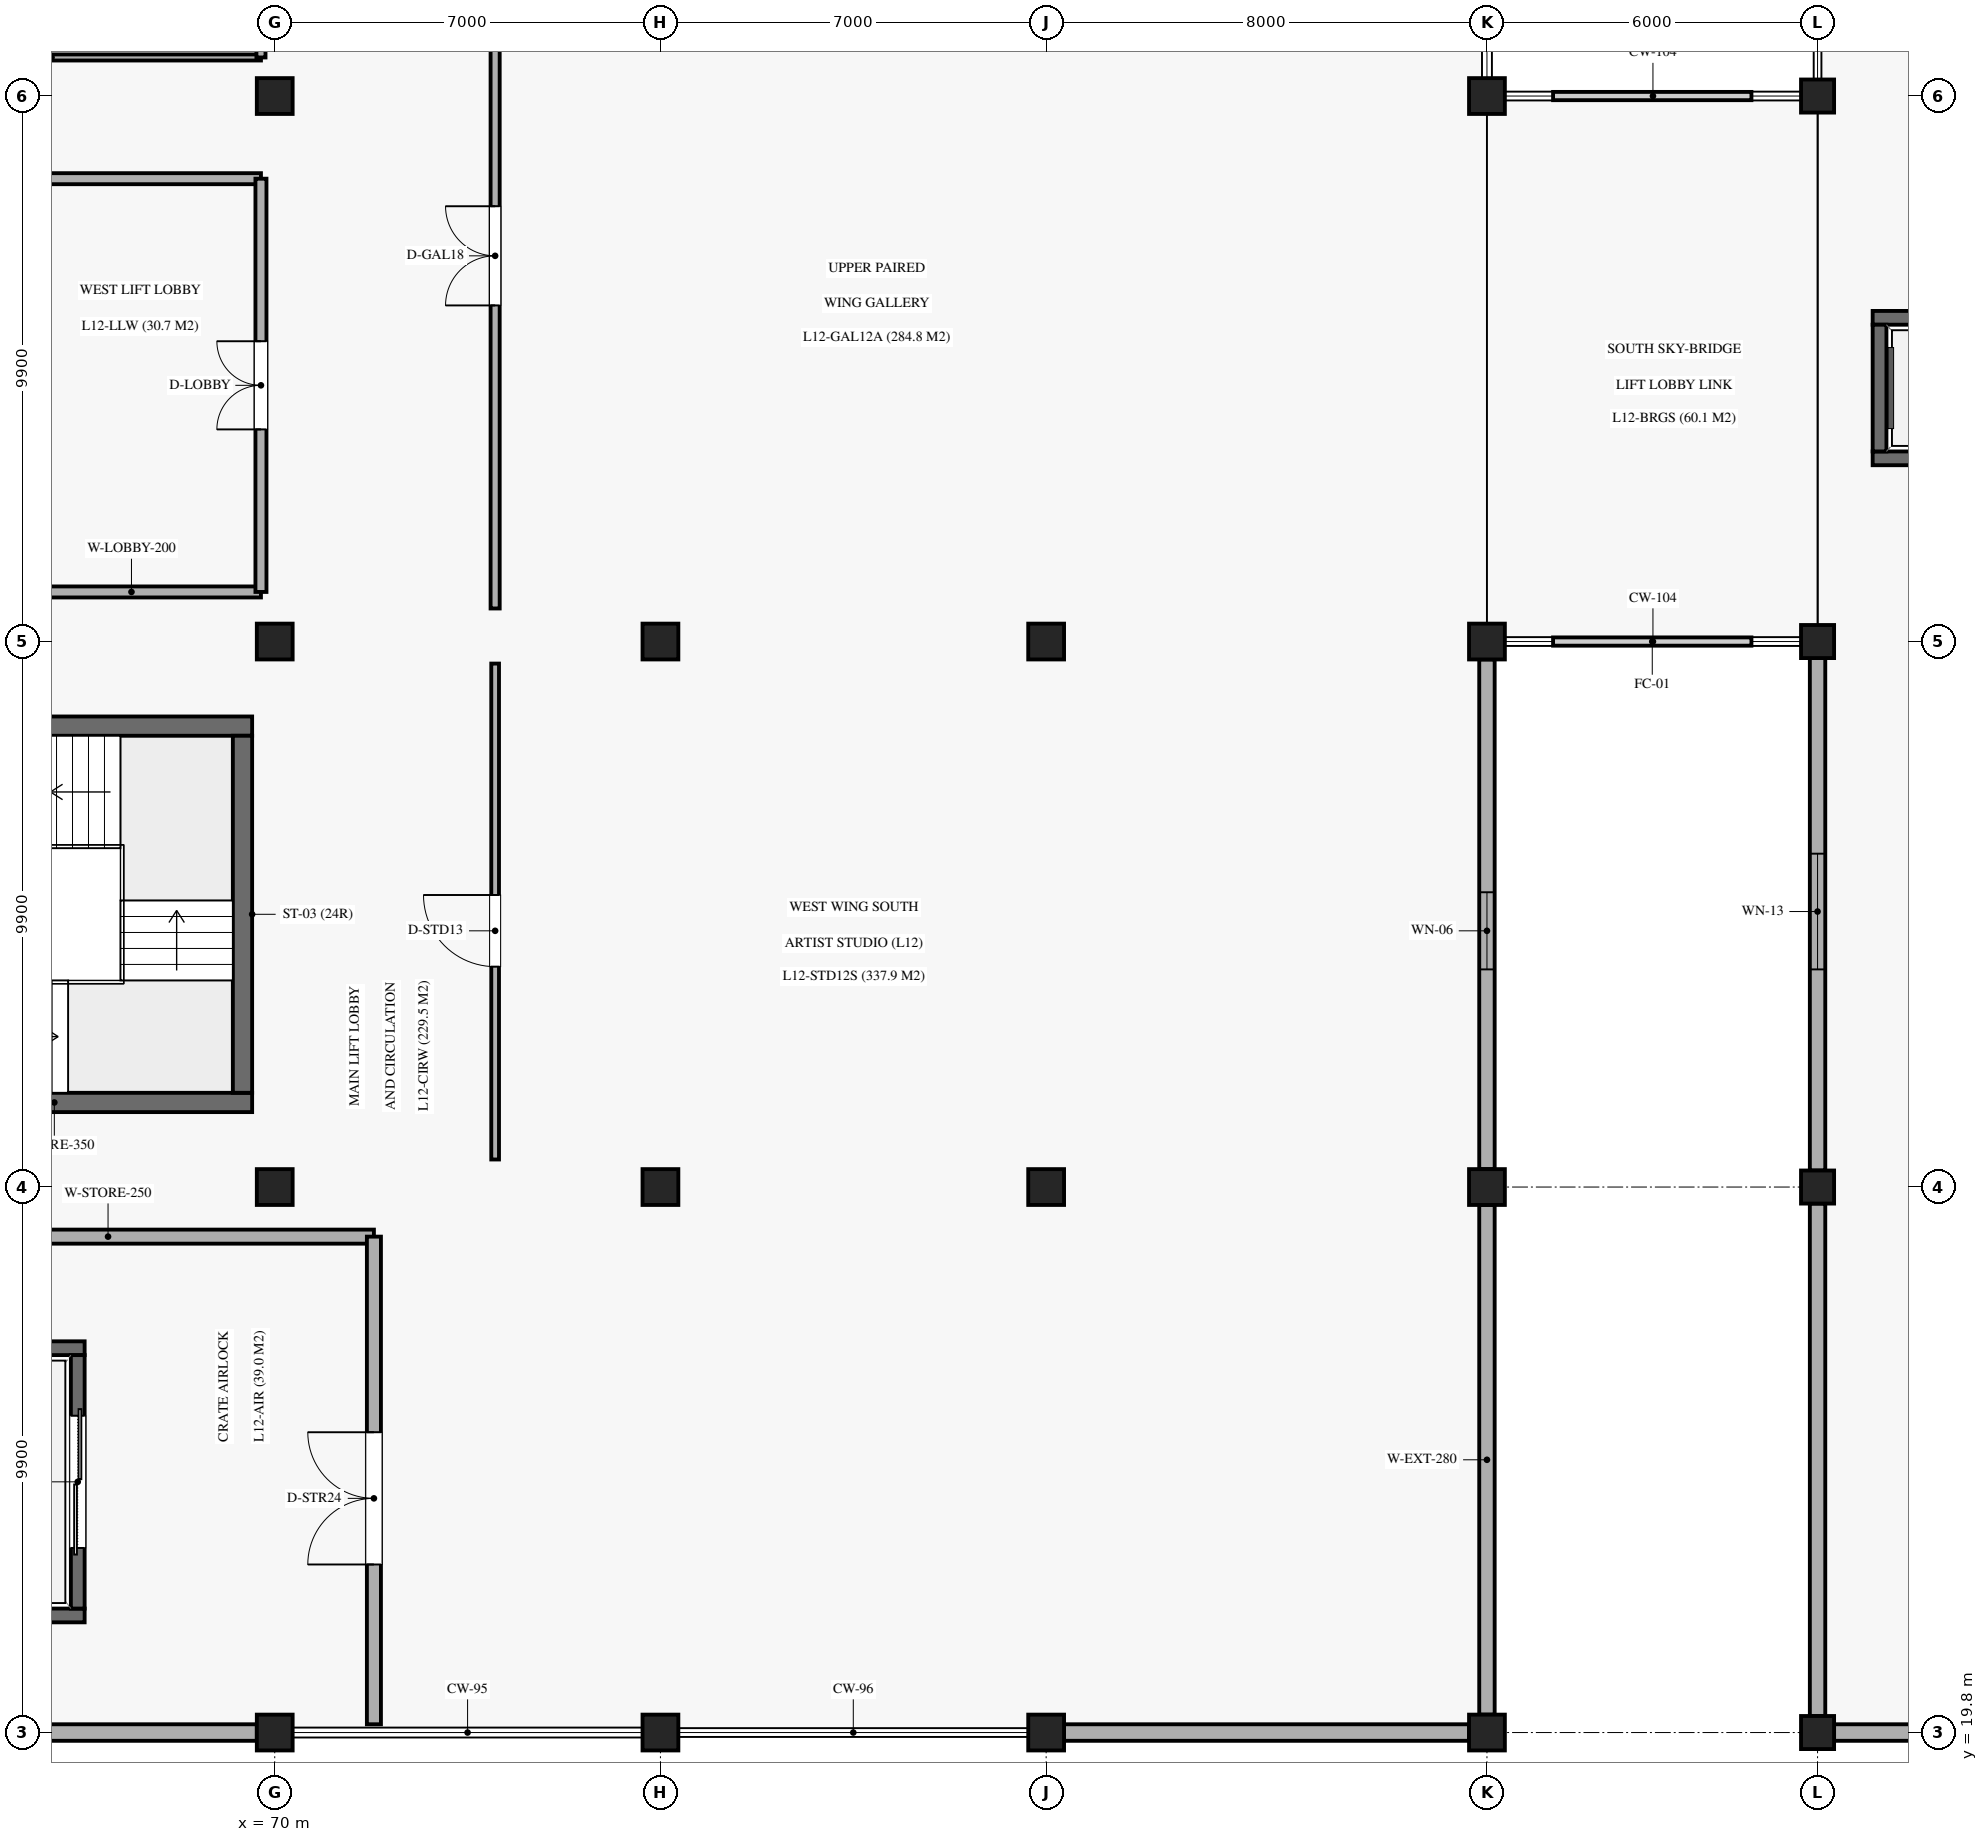
"""IFC4 building model, lengths in metres.
Left out: names, types, materials, properties, quantities, classifications, styles, units other than length and angle.
Written with IfcOpenShell. Run it as: python <this file> out.ifc"""

import sys

from ifc_helpers import new_model, si_unit, direction, frame, frame_2d, origin, origin_2d, place, context, subcontext, project, spatial, rectangle, extrude, element, fill, save


model = new_model("IFC4")
c1 = context("Model", 3, precision=1e-05, world=origin(), true_north=direction((0.0, 1.0)))
c2 = subcontext(c1, "Body", "Model", "MODEL_VIEW")
j1 = project(units=[si_unit("LENGTHUNIT", "METRE"), si_unit("PLANEANGLEUNIT", "RADIAN")], contexts=[c1])
p1 = place(None, origin())
s1 = spatial("IfcSite", under=j1, at=p1, CompositionType="ELEMENT")
p2 = place(p1, origin())
s2 = spatial("IfcBuilding", under=s1, at=p2, CompositionType="ELEMENT")
p3 = place(p2, frame((0.0, 0.0, 62.22)))
s3 = spatial("IfcBuildingStorey", under=s2, at=p3, CompositionType="ELEMENT", Elevation=62.22)
for number, where, z_axis, x_axis in (
    (1, (70.0, 19.8, 0.0), (0.0, 0.0, 1.0), (1.0, 0.0, 0.0)),
    (2, (70.0, 29.7, 0.0), (0.0, 0.0, 1.0), (1.0, 0.0, 0.0)),
    (3, (70.0, 39.6, 0.0), (0.0, 0.0, 1.0), (1.0, 0.0, 0.0)),
    (4, (70.0, 49.5, 0.0), (0.0, 0.0, 1.0), (1.0, 0.0, 0.0)),
    (5, (77.0, 19.8, 0.0), (0.0, 0.0, 1.0), (1.0, 0.0, 0.0)),
    (6, (77.0, 29.7, 0.0), (0.0, 0.0, 1.0), (1.0, 0.0, 0.0)),
    (7, (77.0, 39.6, 0.0), (0.0, 0.0, 1.0), (1.0, 0.0, 0.0)),
    (8, (84.0, 19.8, 0.0), (0.0, 0.0, 1.0), (1.0, 0.0, 0.0)),
    (9, (84.0, 29.7, 0.0), (0.0, 0.0, 1.0), (1.0, 0.0, 0.0)),
    (10, (84.0, 39.6, 0.0), (0.0, 0.0, 1.0), (1.0, 0.0, 0.0)),
    (11, (92.0, 19.8, 0.0), (0.0, 0.0, 1.0), (1.0, 0.0, 0.0)),
    (12, (92.0, 29.7, 0.0), (0.0, 0.0, 1.0), (1.0, 0.0, 0.0)),
    (13, (92.0, 39.6, 0.0), (0.0, 0.0, 1.0), (1.0, 0.0, 0.0)),
    (14, (92.0, 49.5, 0.0), (0.0, 0.0, 1.0), (1.0, 0.0, 0.0)),
):
    element("IfcColumn", number, at=place(p3, frame(where, z_axis=z_axis, x_axis=x_axis)), inside=s3, PredefinedType="COLUMN", context=c2, shape_type="SweptSolid", body=[
        extrude(rectangle(XDim=0.65, YDim=0.65, at=origin_2d()), origin(), (0.0, 0.0, 1.0), 4.08),
    ])
for number, where, z_axis, x_axis in (
    (15, (98.0, 19.8, 0.0), (0.0, 0.0, 1.0), (1.0, 0.0, 0.0)),
    (16, (98.0, 29.7, 0.0), (0.0, 0.0, 1.0), (1.0, 0.0, 0.0)),
    (17, (98.0, 39.6, 0.0), (0.0, 0.0, 1.0), (1.0, 0.0, 0.0)),
    (18, (98.0, 49.5, 0.0), (0.0, 0.0, 1.0), (1.0, 0.0, 0.0)),
):
    element("IfcColumn", number, at=place(p3, frame(where, z_axis=z_axis, x_axis=x_axis)), inside=s3, PredefinedType="COLUMN", context=c2, shape_type="SweptSolid", body=[
        extrude(rectangle(XDim=0.6, YDim=0.6, at=origin_2d()), origin(), (0.0, 0.0, 1.0), 4.08),
    ])
p4 = place(p3, frame((92.0, 20.125, 0.0), z_axis=(0.0, 0.0, 1.0), x_axis=(0.0, 1.0, 0.0)))
e19 = element("IfcWall", 19, at=p4, inside=s3, PredefinedType="SOLIDWALL", context=c2, shape_type="SweptSolid", body=[
    extrude(rectangle(XDim=9.25, YDim=0.28, at=frame_2d((4.625, 0.0))), origin(), (0.0, 0.0, 1.0), 3.1),
])
p5 = place(p3, frame((92.0, 30.025, 0.0), z_axis=(0.0, 0.0, 1.0), x_axis=(0.0, 1.0, 0.0)))
e20 = element("IfcWall", 20, at=p5, inside=s3, PredefinedType="SOLIDWALL", context=c2, shape_type="SweptSolid", body=[
    extrude(rectangle(XDim=9.25, YDim=0.28, at=frame_2d((4.625, 0.0))), origin(), (0.0, 0.0, 1.0), 3.1),
])
p6 = place(p5, frame((3.625, 0.0, 1.15)))
e21 = element("IfcOpeningElement", 21, at=p6, cuts=e20, PredefinedType="OPENING", context=c2, shape_type="SweptSolid", body=[
    extrude(rectangle(XDim=1.4, YDim=1.6, at=frame_2d((0.7, 0.8))), frame((0.0, 0.15, 0.0), z_axis=(0.0, -1.0, 0.0), x_axis=(1.0, 0.0, 0.0)), (0.0, 0.0, 1.0), 0.3),
])
for number, where, z_axis, x_axis in (
    (22, (62.325, 19.8, 0.0), (0.0, 0.0, 1.0), (1.0, 0.0, 0.0)),
    (23, (84.325, 19.8, 0.0), (0.0, 0.0, 1.0), (1.0, 0.0, 0.0)),
):
    element("IfcWall", number, at=place(p3, frame(where, z_axis=z_axis, x_axis=x_axis)), inside=s3, PredefinedType="SOLIDWALL", context=c2, shape_type="SweptSolid", body=[
        extrude(rectangle(XDim=7.35, YDim=0.3, at=frame_2d((3.675, 0.0))), origin(), (0.0, 0.0, 1.0), 3.1),
    ])
p7 = place(p3, frame((98.0, 20.1, 0.0), z_axis=(0.0, 0.0, 1.0), x_axis=(0.0, 1.0, 0.0)))
e24 = element("IfcWall", 24, at=p7, inside=s3, PredefinedType="SOLIDWALL", context=c2, shape_type="SweptSolid", body=[
    extrude(rectangle(XDim=9.3, YDim=0.28, at=frame_2d((4.65, 0.0))), origin(), (0.0, 0.0, 1.0), 3.1),
])
p8 = place(p3, frame((98.0, 30.0, 0.0), z_axis=(0.0, 0.0, 1.0), x_axis=(0.0, 1.0, 0.0)))
e25 = element("IfcWall", 25, at=p8, inside=s3, PredefinedType="SOLIDWALL", context=c2, shape_type="SweptSolid", body=[
    extrude(rectangle(XDim=9.3, YDim=0.28, at=frame_2d((4.65, 0.0))), origin(), (0.0, 0.0, 1.0), 3.1),
])
p9 = place(p8, frame((3.65, 0.0, 1.15)))
e26 = element("IfcOpeningElement", 26, at=p9, cuts=e25, PredefinedType="OPENING", context=c2, shape_type="SweptSolid", body=[
    extrude(rectangle(XDim=2.1, YDim=1.5, at=frame_2d((1.05, 0.75))), frame((0.0, 0.15, 0.0), z_axis=(0.0, -1.0, 0.0), x_axis=(1.0, 0.0, 0.0)), (0.0, 0.0, 1.0), 0.3),
])
p10 = place(p3, frame((98.3, 19.8, 0.0), z_axis=(0.0, 0.0, 1.0), x_axis=(1.0, 0.0, 0.0)))
e27 = element("IfcWall", 27, at=p10, inside=s3, PredefinedType="SOLIDWALL", context=c2, shape_type="SweptSolid", body=[
    extrude(rectangle(XDim=7.575, YDim=0.3, at=frame_2d((3.788, 0.0))), origin(), (0.0, 0.0, 1.0), 3.1),
])
p11 = place(p3, frame((62.41, 31.235, 0.0), z_axis=(0.0, 0.0, 1.0), x_axis=(1.0, 0.0, 0.0)))
e28 = element("IfcWall", 28, at=p11, inside=s3, PredefinedType="SHEAR", context=c2, shape_type="SweptSolid", body=[
    extrude(rectangle(XDim=7.18, YDim=0.35, at=frame_2d((3.59, 0.0))), origin(), (0.0, 0.0, 1.0), 3.85),
])
p12 = place(p11, frame((0.77, 0.0, 0.0)))
e29 = element("IfcOpeningElement", 29, at=p12, cuts=e28, PredefinedType="OPENING", context=c2, shape_type="SweptSolid", body=[
    extrude(rectangle(XDim=1.2, YDim=2.2, at=frame_2d((0.6, 1.1))), frame((0.0, 0.185, 0.0), z_axis=(0.0, -1.0, 0.0), x_axis=(1.0, 0.0, 0.0)), (0.0, 0.0, 1.0), 0.37),
])
p13 = place(p3, frame((62.41, 38.065, 0.0), z_axis=(0.0, 0.0, 1.0), x_axis=(1.0, 0.0, 0.0)))
e30 = element("IfcWall", 30, at=p13, inside=s3, PredefinedType="SHEAR", context=c2, shape_type="SweptSolid", body=[
    extrude(rectangle(XDim=7.18, YDim=0.35, at=frame_2d((3.59, 0.0))), origin(), (0.0, 0.0, 1.0), 3.85),
])
p14 = place(p3, frame((69.415, 31.41, 0.0), z_axis=(0.0, 0.0, 1.0), x_axis=(0.0, 1.0, 0.0)))
e31 = element("IfcWall", 31, at=p14, inside=s3, PredefinedType="SHEAR", context=c2, shape_type="SweptSolid", body=[
    extrude(rectangle(XDim=6.48, YDim=0.35, at=frame_2d((3.24, 0.0))), origin(), (0.0, 0.0, 1.0), 3.85),
])
for number, where, z_axis, x_axis in (
    (32, (99.0, 42.925, 0.0), (0.0, 0.0, 1.0), (1.0, 0.0, 0.0)),
    (33, (99.0, 45.475, 0.0), (0.0, 0.0, 1.0), (1.0, 0.0, 0.0)),
):
    element("IfcWall", number, at=place(p3, frame(where, z_axis=z_axis, x_axis=x_axis)), inside=s3, PredefinedType="SOLIDWALL", context=c2, shape_type="SweptSolid", body=[
        extrude(rectangle(XDim=2.5, YDim=0.25, at=frame_2d((1.25, 0.0))), origin(), (0.0, 0.0, 1.0), 3.83),
    ])
p15 = place(p3, frame((99.125, 43.05, 0.0), z_axis=(0.0, 0.0, 1.0), x_axis=(0.0, 1.0, 0.0)))
e34 = element("IfcWall", 34, at=p15, inside=s3, PredefinedType="SOLIDWALL", context=c2, shape_type="SweptSolid", body=[
    extrude(rectangle(XDim=2.3, YDim=0.25, at=frame_2d((1.15, 0.0))), origin(), (0.0, 0.0, 1.0), 3.83),
])
for number, where, z_axis, x_axis in (
    (35, (62.65, 21.925, 0.0), (0.0, 0.0, 1.0), (1.0, 0.0, 0.0)),
    (36, (62.65, 26.775, 0.0), (0.0, 0.0, 1.0), (1.0, 0.0, 0.0)),
):
    element("IfcWall", number, at=place(p3, frame(where, z_axis=z_axis, x_axis=x_axis)), inside=s3, PredefinedType="SOLIDWALL", context=c2, shape_type="SweptSolid", body=[
        extrude(rectangle(XDim=3.9, YDim=0.25, at=frame_2d((1.95, 0.0))), origin(), (0.0, 0.0, 1.0), 3.83),
    ])
p16 = place(p3, frame((66.425, 22.05, 0.0), z_axis=(0.0, 0.0, 1.0), x_axis=(0.0, 1.0, 0.0)))
e37 = element("IfcWall", 37, at=p16, inside=s3, PredefinedType="SOLIDWALL", context=c2, shape_type="SweptSolid", body=[
    extrude(rectangle(XDim=4.6, YDim=0.25, at=frame_2d((2.3, 0.0))), origin(), (0.0, 0.0, 1.0), 3.83),
])
p17 = place(p16, frame((1.1, 0.0, 0.0)))
e38 = element("IfcOpeningElement", 38, at=p17, cuts=e37, PredefinedType="OPENING", context=c2, shape_type="SweptSolid", body=[
    extrude(rectangle(XDim=2.4, YDim=2.65, at=frame_2d((1.2, 1.325))), frame((0.0, 0.135, 0.0), z_axis=(0.0, -1.0, 0.0), x_axis=(1.0, 0.0, 0.0)), (0.0, 0.0, 1.0), 0.27),
])
for number, where, z_axis, x_axis in (
    (39, (65.05, 40.5, 0.0), (0.0, 0.0, 1.0), (1.0, 0.0, 0.0)),
    (40, (65.05, 48.0, 0.0), (0.0, 0.0, 1.0), (1.0, 0.0, 0.0)),
):
    element("IfcWall", number, at=place(p3, frame(where, z_axis=z_axis, x_axis=x_axis)), inside=s3, PredefinedType="SOLIDWALL", context=c2, shape_type="SweptSolid", body=[
        extrude(rectangle(XDim=4.7, YDim=0.2, at=frame_2d((2.35, 0.0))), origin(), (0.0, 0.0, 1.0), 2.97),
    ])
p18 = place(p3, frame((69.75, 40.5, 0.0), z_axis=(0.0, 0.0, 1.0), x_axis=(0.0, 1.0, 0.0)))
e41 = element("IfcWall", 41, at=p18, inside=s3, PredefinedType="SOLIDWALL", context=c2, shape_type="SweptSolid", body=[
    extrude(rectangle(XDim=7.5, YDim=0.2, at=frame_2d((3.75, 0.0))), origin(), (0.0, 0.0, 1.0), 2.97),
])
p19 = place(p18, frame((2.95, 0.0, 0.0)))
e42 = element("IfcOpeningElement", 42, at=p19, cuts=e41, PredefinedType="OPENING", context=c2, shape_type="SweptSolid", body=[
    extrude(rectangle(XDim=1.6, YDim=2.2, at=frame_2d((0.8, 1.1))), frame((0.0, 0.11, 0.0), z_axis=(0.0, -1.0, 0.0), x_axis=(1.0, 0.0, 0.0)), (0.0, 0.0, 1.0), 0.22),
])
p20 = place(p3, frame((62.15, 28.8, 0.0), z_axis=(0.0, 0.0, 1.0), x_axis=(1.0, 0.0, 0.0)))
e43 = element("IfcWall", 43, at=p20, inside=s3, PredefinedType="SOLIDWALL", context=c2, shape_type="SweptSolid", body=[
    extrude(rectangle(XDim=9.65, YDim=0.255, at=frame_2d((4.825, 0.0))), origin(), (0.0, 0.0, 1.0), 2.97),
])
p21 = place(p3, frame((71.8, 19.95, 0.0), z_axis=(0.0, 0.0, 1.0), x_axis=(0.0, 1.0, 0.0)))
e44 = element("IfcWall", 44, at=p21, inside=s3, PredefinedType="SOLIDWALL", context=c2, shape_type="SweptSolid", body=[
    extrude(rectangle(XDim=8.85, YDim=0.255, at=frame_2d((4.425, 0.0))), origin(), (0.0, 0.0, 1.0), 2.97),
])
p22 = place(p21, frame((2.9, 0.0, 0.0)))
e45 = element("IfcOpeningElement", 45, at=p22, cuts=e44, PredefinedType="OPENING", context=c2, shape_type="SweptSolid", body=[
    extrude(rectangle(XDim=2.4, YDim=2.5, at=frame_2d((1.2, 1.25))), frame((0.0, 0.137, 0.0), z_axis=(0.0, -1.0, 0.0), x_axis=(1.0, 0.0, 0.0)), (0.0, 0.0, 1.0), 0.275),
])
p23 = place(p3, frame((62.15, 50.2, 0.0), z_axis=(0.0, 0.0, 1.0), x_axis=(1.0, 0.0, 0.0)))
e46 = element("IfcWall", 46, at=p23, inside=s3, PredefinedType="PARTITIONING", context=c2, shape_type="SweptSolid", body=[
    extrude(rectangle(XDim=7.6, YDim=0.11, at=frame_2d((3.8, 0.0))), origin(), (0.0, 0.0, 1.0), 2.97),
])
p24 = place(p3, frame((69.75, 50.2, 0.0), z_axis=(0.0, 0.0, 1.0), x_axis=(0.0, 1.0, 0.0)))
e47 = element("IfcWall", 47, at=p24, inside=s3, PredefinedType="PARTITIONING", context=c2, shape_type="SweptSolid", body=[
    extrude(rectangle(XDim=5.2, YDim=0.165, at=frame_2d((2.6, 0.0))), origin(), (0.0, 0.0, 1.0), 2.97),
])
p25 = place(p24, frame((2.0, 0.0, 0.0)))
e48 = element("IfcOpeningElement", 48, at=p25, cuts=e47, PredefinedType="OPENING", context=c2, shape_type="SweptSolid", body=[
    extrude(rectangle(XDim=1.0, YDim=2.1, at=frame_2d((0.5, 1.05))), frame((0.0, 0.093, 0.0), z_axis=(0.0, -1.0, 0.0), x_axis=(1.0, 0.0, 0.0)), (0.0, 0.0, 1.0), 0.185),
])
p26 = place(p3, frame((74.0, 40.2, 0.0), z_axis=(0.0, 0.0, 1.0), x_axis=(0.0, 1.0, 0.0)))
e49 = element("IfcWall", 49, at=p26, inside=s3, PredefinedType="PARTITIONING", context=c2, shape_type="SweptSolid", body=[
    extrude(rectangle(XDim=18.3, YDim=0.165, at=frame_2d((9.15, 0.0))), origin(), (0.0, 0.0, 1.0), 2.97),
])
p27 = place(p26, frame((5.5, 0.0, 0.0)))
e50 = element("IfcOpeningElement", 50, at=p27, cuts=e49, PredefinedType="OPENING", context=c2, shape_type="SweptSolid", body=[
    extrude(rectangle(XDim=1.8, YDim=2.45, at=frame_2d((0.9, 1.225))), frame((0.0, 0.093, 0.0), z_axis=(0.0, -1.0, 0.0), x_axis=(1.0, 0.0, 0.0)), (0.0, 0.0, 1.0), 0.185),
])
p28 = place(p3, frame((74.0, 30.2, 0.0), z_axis=(0.0, 0.0, 1.0), x_axis=(0.0, 1.0, 0.0)))
e51 = element("IfcWall", 51, at=p28, inside=s3, PredefinedType="PARTITIONING", context=c2, shape_type="SweptSolid", body=[
    extrude(rectangle(XDim=9.0, YDim=0.14, at=frame_2d((4.5, 0.0))), origin(), (0.0, 0.0, 1.0), 2.97),
])
p29 = place(p28, frame((3.5, 0.0, 0.0)))
e52 = element("IfcOpeningElement", 52, at=p29, cuts=e51, PredefinedType="OPENING", context=c2, shape_type="SweptSolid", body=[
    extrude(rectangle(XDim=1.3, YDim=2.25, at=frame_2d((0.65, 1.125))), frame((0.0, 0.08, 0.0), z_axis=(0.0, -1.0, 0.0), x_axis=(1.0, 0.0, 0.0)), (0.0, 0.0, 1.0), 0.16),
])
p30 = place(p6, origin())
e53 = element("IfcWindow", 53, at=p30, inside=s3, PartitioningType="SINGLE_PANEL", PredefinedType="WINDOW", context=c2, shape_type="SweptSolid", body=[
    extrude(rectangle(XDim=1.4, YDim=1.6, at=frame_2d((0.7, 0.8))), frame((0.0, 0.03, 0.0), z_axis=(0.0, -1.0, 0.0), x_axis=(1.0, 0.0, 0.0)), (0.0, 0.0, 1.0), 0.06),
])
fill(e21, e53)
p31 = place(p9, origin())
e54 = element("IfcWindow", 54, at=p31, inside=s3, PartitioningType="SINGLE_PANEL", PredefinedType="WINDOW", context=c2, shape_type="SweptSolid", body=[
    extrude(rectangle(XDim=2.1, YDim=1.5, at=frame_2d((1.05, 0.75))), frame((0.0, 0.03, 0.0), z_axis=(0.0, -1.0, 0.0), x_axis=(1.0, 0.0, 0.0)), (0.0, 0.0, 1.0), 0.06),
])
fill(e26, e54)
p32 = place(p17, origin())
e55 = element("IfcDoor", 55, at=p32, inside=s3, OperationType="DOUBLE_DOOR_SLIDING", PredefinedType="DOOR", context=c2, shape_type="SweptSolid", body=[
    extrude(rectangle(XDim=2.4, YDim=2.65, at=frame_2d((1.2, 1.325))), frame((0.0, 0.025, 0.0), z_axis=(0.0, -1.0, 0.0), x_axis=(1.0, 0.0, 0.0)), (0.0, 0.0, 1.0), 0.05),
])
fill(e38, e55)
p33 = place(p19, origin())
e56 = element("IfcDoor", 56, at=p33, inside=s3, OperationType="DOUBLE_DOOR_SINGLE_SWING", PredefinedType="DOOR", context=c2, shape_type="SweptSolid", body=[
    extrude(rectangle(XDim=1.6, YDim=2.2, at=frame_2d((0.8, 1.1))), frame((0.0, 0.025, 0.0), z_axis=(0.0, -1.0, 0.0), x_axis=(1.0, 0.0, 0.0)), (0.0, 0.0, 1.0), 0.05),
])
fill(e42, e56)
p34 = place(p22, origin())
e57 = element("IfcDoor", 57, at=p34, inside=s3, OperationType="DOUBLE_DOOR_SINGLE_SWING", PredefinedType="DOOR", context=c2, shape_type="SweptSolid", body=[
    extrude(rectangle(XDim=2.4, YDim=2.5, at=frame_2d((1.2, 1.25))), frame((0.0, 0.025, 0.0), z_axis=(0.0, -1.0, 0.0), x_axis=(1.0, 0.0, 0.0)), (0.0, 0.0, 1.0), 0.05),
])
fill(e45, e57)
p35 = place(p27, origin())
e58 = element("IfcDoor", 58, at=p35, inside=s3, OperationType="DOUBLE_DOOR_SINGLE_SWING", PredefinedType="DOOR", context=c2, shape_type="SweptSolid", body=[
    extrude(rectangle(XDim=1.8, YDim=2.45, at=frame_2d((0.9, 1.225))), frame((0.0, 0.025, 0.0), z_axis=(0.0, -1.0, 0.0), x_axis=(1.0, 0.0, 0.0)), (0.0, 0.0, 1.0), 0.05),
])
fill(e50, e58)
p36 = place(p29, origin())
e59 = element("IfcDoor", 59, at=p36, inside=s3, OperationType="SINGLE_SWING_RIGHT", PredefinedType="DOOR", context=c2, shape_type="SweptSolid", body=[
    extrude(rectangle(XDim=1.3, YDim=2.25, at=frame_2d((0.65, 1.125))), frame((0.0, 0.025, 0.0), z_axis=(0.0, -1.0, 0.0), x_axis=(1.0, 0.0, 0.0)), (0.0, 0.0, 1.0), 0.05),
])
fill(e52, e59)
save(model, sys.argv[1])
